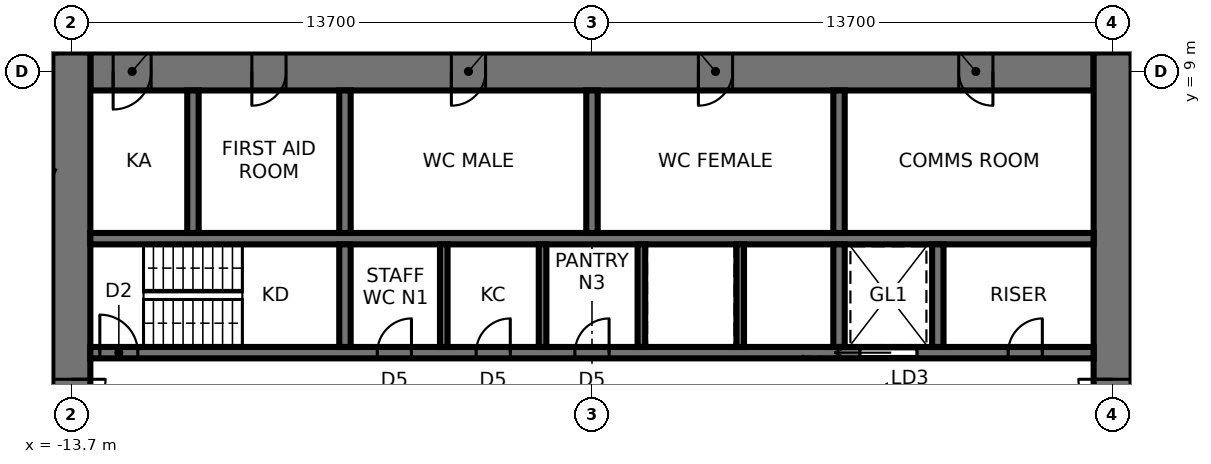
"""IFC4 building model, lengths in metres.
Left out: names, types, materials, properties, quantities, classifications, styles, units other than length and angle.
Written with IfcOpenShell. Run it as: python <this file> out.ifc"""

import sys

from ifc_helpers import new_model, si_unit, direction, frame, frame_2d, origin, place, context, subcontext, project, spatial, rectangle, extrude, element, fill, save


model = new_model("IFC4")
c1 = context("Model", 3, precision=1e-05, world=origin(), true_north=direction((0.0, 1.0)))
c2 = subcontext(c1, "Body", "Model", "MODEL_VIEW")
j1 = project(units=[si_unit("LENGTHUNIT", "METRE"), si_unit("PLANEANGLEUNIT", "RADIAN")], contexts=[c1])
p1 = place(None, origin())
s1 = spatial("IfcSite", under=j1, at=p1, CompositionType="ELEMENT")
p2 = place(p1, origin())
s2 = spatial("IfcBuilding", under=s1, at=p2, CompositionType="ELEMENT")
p3 = place(p2, frame((0.0, 0.0, 127.5)))
s3 = spatial("IfcBuildingStorey", under=s2, at=p3, CompositionType="ELEMENT", Elevation=127.5)
p4 = place(p3, frame((13.2, 9.0, 0.0), z_axis=(0.0, 0.0, 1.0), x_axis=(-1.0, 0.0, 0.0)))
e1 = element("IfcWall", 1, at=p4, inside=s3, PredefinedType="SHEAR", context=c2, shape_type="SweptSolid", body=[
    extrude(rectangle(XDim=26.4, YDim=1.0, at=frame_2d((13.2, 0.0))), origin(), (0.0, 0.0, 1.0), 3.9),
])
p5 = place(p4, frame((2.65, 0.0, 0.0)))
e2 = element("IfcOpeningElement", 2, at=p5, cuts=e1, PredefinedType="OPENING", context=c2, shape_type="SweptSolid", body=[
    extrude(rectangle(XDim=0.9, YDim=2.1, at=frame_2d((0.45, 1.05))), frame((0.0, 0.51, 0.0), z_axis=(0.0, -1.0, 0.0), x_axis=(1.0, 0.0, 0.0)), (0.0, 0.0, 1.0), 1.02),
])
p6 = place(p4, frame((9.5, 0.0, 0.0)))
e3 = element("IfcOpeningElement", 3, at=p6, cuts=e1, PredefinedType="OPENING", context=c2, shape_type="SweptSolid", body=[
    extrude(rectangle(XDim=0.9, YDim=2.1, at=frame_2d((0.45, 1.05))), frame((0.0, 0.51, 0.0), z_axis=(0.0, -1.0, 0.0), x_axis=(1.0, 0.0, 0.0)), (0.0, 0.0, 1.0), 1.02),
])
p7 = place(p4, frame((16.0, 0.0, 0.0)))
e4 = element("IfcOpeningElement", 4, at=p7, cuts=e1, PredefinedType="OPENING", context=c2, shape_type="SweptSolid", body=[
    extrude(rectangle(XDim=0.9, YDim=2.1, at=frame_2d((0.45, 1.05))), frame((0.0, 0.51, 0.0), z_axis=(0.0, -1.0, 0.0), x_axis=(1.0, 0.0, 0.0)), (0.0, 0.0, 1.0), 1.02),
])
p8 = place(p4, frame((21.25, 0.0, 0.0)))
e5 = element("IfcOpeningElement", 5, at=p8, cuts=e1, PredefinedType="OPENING", context=c2, shape_type="SweptSolid", body=[
    extrude(rectangle(XDim=0.9, YDim=2.1, at=frame_2d((0.45, 1.05))), frame((0.0, 0.51, 0.0), z_axis=(0.0, -1.0, 0.0), x_axis=(1.0, 0.0, 0.0)), (0.0, 0.0, 1.0), 1.02),
])
p9 = place(p4, frame((24.8, 0.0, 0.0)))
e6 = element("IfcOpeningElement", 6, at=p9, cuts=e1, PredefinedType="OPENING", context=c2, shape_type="SweptSolid", body=[
    extrude(rectangle(XDim=1.0, YDim=2.1, at=frame_2d((0.5, 1.05))), frame((0.0, 0.51, 0.0), z_axis=(0.0, -1.0, 0.0), x_axis=(1.0, 0.0, 0.0)), (0.0, 0.0, 1.0), 1.02),
])
p10 = place(p3, frame((13.7, -9.5, 0.0), z_axis=(0.0, 0.0, 1.0), x_axis=(0.0, 1.0, 0.0)))
e7 = element("IfcWall", 7, at=p10, inside=s3, PredefinedType="SHEAR", context=c2, shape_type="SweptSolid", body=[
    extrude(rectangle(XDim=19.0, YDim=1.0, at=frame_2d((9.5, 0.0))), origin(), (0.0, 0.0, 1.0), 3.9),
])
p11 = place(p10, frame((8.6, 0.0, 0.0)))
e8 = element("IfcOpeningElement", 8, at=p11, cuts=e7, PredefinedType="OPENING", context=c2, shape_type="SweptSolid", body=[
    extrude(rectangle(XDim=1.8, YDim=2.4, at=frame_2d((0.9, 1.2))), frame((0.0, 0.51, 0.0), z_axis=(0.0, -1.0, 0.0), x_axis=(1.0, 0.0, 0.0)), (0.0, 0.0, 1.0), 1.02),
])
p12 = place(p3, frame((-13.7, 9.5, 0.0), z_axis=(0.0, 0.0, 1.0), x_axis=(0.0, -1.0, 0.0)))
e9 = element("IfcWall", 9, at=p12, inside=s3, PredefinedType="SHEAR", context=c2, shape_type="SweptSolid", body=[
    extrude(rectangle(XDim=19.0, YDim=1.0, at=frame_2d((9.5, 0.0))), origin(), (0.0, 0.0, 1.0), 3.9),
])
p13 = place(p12, frame((8.6, 0.0, 0.0)))
e10 = element("IfcOpeningElement", 10, at=p13, cuts=e9, PredefinedType="OPENING", context=c2, shape_type="SweptSolid", body=[
    extrude(rectangle(XDim=1.8, YDim=2.4, at=frame_2d((0.9, 1.2))), frame((0.0, 0.51, 0.0), z_axis=(0.0, -1.0, 0.0), x_axis=(1.0, 0.0, 0.0)), (0.0, 0.0, 1.0), 1.02),
])
p14 = place(p3, frame((-13.2, 1.6, 0.0), z_axis=(0.0, 0.0, 1.0), x_axis=(1.0, 0.0, 0.0)))
e11 = element("IfcWall", 11, at=p14, inside=s3, PredefinedType="SHEAR", context=c2, shape_type="SweptSolid", body=[
    extrude(rectangle(XDim=26.4, YDim=0.3, at=frame_2d((13.2, 0.0))), origin(), (0.0, 0.0, 1.0), 3.9),
])
p15 = place(p14, frame((0.25, 0.0, 0.0)))
e12 = element("IfcOpeningElement", 12, at=p15, cuts=e11, PredefinedType="OPENING", context=c2, shape_type="SweptSolid", body=[
    extrude(rectangle(XDim=1.0, YDim=2.1, at=frame_2d((0.5, 1.05))), frame((0.0, 0.16, 0.0), z_axis=(0.0, -1.0, 0.0), x_axis=(1.0, 0.0, 0.0)), (0.0, 0.0, 1.0), 0.32),
])
p16 = place(p14, frame((20.25, 0.0, 0.0)))
e13 = element("IfcOpeningElement", 13, at=p16, cuts=e11, PredefinedType="OPENING", context=c2, shape_type="SweptSolid", body=[
    extrude(rectangle(XDim=1.5, YDim=2.4, at=frame_2d((0.75, 1.2))), frame((0.0, 0.16, 0.0), z_axis=(0.0, -1.0, 0.0), x_axis=(1.0, 0.0, 0.0)), (0.0, 0.0, 1.0), 0.32),
])
p17 = place(p14, frame((7.55, 0.0, 0.0)))
e14 = element("IfcOpeningElement", 14, at=p17, cuts=e11, PredefinedType="OPENING", context=c2, shape_type="SweptSolid", body=[
    extrude(rectangle(XDim=0.9, YDim=2.1, at=frame_2d((0.45, 1.05))), frame((0.0, 0.16, 0.0), z_axis=(0.0, -1.0, 0.0), x_axis=(1.0, 0.0, 0.0)), (0.0, 0.0, 1.0), 0.32),
])
p18 = place(p14, frame((10.15, 0.0, 0.0)))
e15 = element("IfcOpeningElement", 15, at=p18, cuts=e11, PredefinedType="OPENING", context=c2, shape_type="SweptSolid", body=[
    extrude(rectangle(XDim=0.9, YDim=2.1, at=frame_2d((0.45, 1.05))), frame((0.0, 0.16, 0.0), z_axis=(0.0, -1.0, 0.0), x_axis=(1.0, 0.0, 0.0)), (0.0, 0.0, 1.0), 0.32),
])
p19 = place(p14, frame((12.75, 0.0, 0.0)))
e16 = element("IfcOpeningElement", 16, at=p19, cuts=e11, PredefinedType="OPENING", context=c2, shape_type="SweptSolid", body=[
    extrude(rectangle(XDim=0.9, YDim=2.1, at=frame_2d((0.45, 1.05))), frame((0.0, 0.16, 0.0), z_axis=(0.0, -1.0, 0.0), x_axis=(1.0, 0.0, 0.0)), (0.0, 0.0, 1.0), 0.32),
])
p20 = place(p14, frame((24.15, 0.0, 0.0)))
e17 = element("IfcOpeningElement", 17, at=p20, cuts=e11, PredefinedType="OPENING", context=c2, shape_type="SweptSolid", body=[
    extrude(rectangle(XDim=0.9, YDim=2.1, at=frame_2d((0.45, 1.05))), frame((0.0, 0.16, 0.0), z_axis=(0.0, -1.0, 0.0), x_axis=(1.0, 0.0, 0.0)), (0.0, 0.0, 1.0), 0.32),
])
p21 = place(p3, frame((-13.2, 4.6, 0.0), z_axis=(0.0, 0.0, 1.0), x_axis=(1.0, 0.0, 0.0)))
e18 = element("IfcWall", 18, at=p21, inside=s3, PredefinedType="SHEAR", context=c2, shape_type="SweptSolid", body=[
    extrude(rectangle(XDim=26.4, YDim=0.3, at=frame_2d((13.2, 0.0))), origin(), (0.0, 0.0, 1.0), 3.9),
])
p22 = place(p3, frame((-6.5, 1.75, 0.0), z_axis=(0.0, 0.0, 1.0), x_axis=(0.0, 1.0, 0.0)))
e19 = element("IfcWall", 19, at=p22, inside=s3, PredefinedType="SHEAR", context=c2, shape_type="SweptSolid", body=[
    extrude(rectangle(XDim=2.7, YDim=0.3, at=frame_2d((1.35, 0.0))), origin(), (0.0, 0.0, 1.0), 3.9),
])
p23 = place(p3, frame((-6.5, 4.75, 0.0), z_axis=(0.0, 0.0, 1.0), x_axis=(0.0, 1.0, 0.0)))
e20 = element("IfcWall", 20, at=p23, inside=s3, PredefinedType="SHEAR", context=c2, shape_type="SweptSolid", body=[
    extrude(rectangle(XDim=3.75, YDim=0.3, at=frame_2d((1.875, 0.0))), origin(), (0.0, 0.0, 1.0), 3.9),
])
p24 = place(p3, frame((6.5, 1.75, 0.0), z_axis=(0.0, 0.0, 1.0), x_axis=(0.0, 1.0, 0.0)))
e21 = element("IfcWall", 21, at=p24, inside=s3, PredefinedType="SHEAR", context=c2, shape_type="SweptSolid", body=[
    extrude(rectangle(XDim=2.7, YDim=0.3, at=frame_2d((1.35, 0.0))), origin(), (0.0, 0.0, 1.0), 3.9),
])
p25 = place(p3, frame((6.5, 4.75, 0.0), z_axis=(0.0, 0.0, 1.0), x_axis=(0.0, 1.0, 0.0)))
e22 = element("IfcWall", 22, at=p25, inside=s3, PredefinedType="SHEAR", context=c2, shape_type="SweptSolid", body=[
    extrude(rectangle(XDim=3.75, YDim=0.3, at=frame_2d((1.875, 0.0))), origin(), (0.0, 0.0, 1.0), 3.9),
])
for number, where, z_axis, x_axis in (
    (23, (-3.9, 1.75, 0.0), (0.0, 0.0, 1.0), (0.0, 1.0, 0.0)),
    (24, (-1.3, 1.75, 0.0), (0.0, 0.0, 1.0), (0.0, 1.0, 0.0)),
    (25, (1.3, 1.75, 0.0), (0.0, 0.0, 1.0), (0.0, 1.0, 0.0)),
    (26, (3.9, 1.75, 0.0), (0.0, 0.0, 1.0), (0.0, 1.0, 0.0)),
):
    element("IfcWall", number, at=place(p3, frame(where, z_axis=z_axis, x_axis=x_axis)), inside=s3, PredefinedType="SHEAR", context=c2, shape_type="SweptSolid", body=[
        extrude(rectangle(XDim=2.7, YDim=0.2, at=frame_2d((1.35, 0.0))), origin(), (0.0, 0.0, 1.0), 3.9),
    ])
for number, where, z_axis, x_axis in (
    (27, (0.0, 4.75, 0.0), (0.0, 0.0, 1.0), (0.0, 1.0, 0.0)),
    (28, (-10.5, 4.75, 0.0), (0.0, 0.0, 1.0), (0.0, 1.0, 0.0)),
):
    element("IfcWall", number, at=place(p3, frame(where, z_axis=z_axis, x_axis=x_axis)), inside=s3, PredefinedType="SHEAR", context=c2, shape_type="SweptSolid", body=[
        extrude(rectangle(XDim=3.75, YDim=0.3, at=frame_2d((1.875, 0.0))), origin(), (0.0, 0.0, 1.0), 3.9),
    ])
p26 = place(p3, frame((9.1, 1.75, 0.0), z_axis=(0.0, 0.0, 1.0), x_axis=(0.0, 1.0, 0.0)))
e29 = element("IfcWall", 29, at=p26, inside=s3, PredefinedType="SHEAR", context=c2, shape_type="SweptSolid", body=[
    extrude(rectangle(XDim=2.7, YDim=0.3, at=frame_2d((1.35, 0.0))), origin(), (0.0, 0.0, 1.0), 3.9),
])
p27 = place(p3, frame((-14.2, 6.322, 0.0), z_axis=(0.0, 0.0, 1.0), x_axis=(-0.913544220381, 0.406739421999, 0.0)))
e30 = element("IfcWall", 30, at=p27, inside=s3, PredefinedType="PARTITIONING", context=c2, shape_type="SweptSolid", body=[
    extrude(rectangle(XDim=9.271, YDim=0.15, at=frame_2d((4.636, 0.0))), origin(), (0.0, 0.0, 1.0), 3.74),
])
p28 = place(p13, origin())
e31 = element("IfcDoor", 31, at=p28, inside=s3, OperationType="DOUBLE_DOOR_SINGLE_SWING", PredefinedType="DOOR", context=c2, shape_type="SweptSolid", body=[
    extrude(rectangle(XDim=1.72, YDim=2.36, at=frame_2d((0.9, 1.18))), frame((0.0, 0.025, 0.0), z_axis=(0.0, -1.0, 0.0), x_axis=(1.0, 0.0, 0.0)), (0.0, 0.0, 1.0), 0.05),
    extrude(rectangle(XDim=0.04, YDim=2.4, at=frame_2d((0.02, 1.2))), frame((0.0, 0.25, 0.0), z_axis=(0.0, -1.0, 0.0), x_axis=(1.0, 0.0, 0.0)), (0.0, 0.0, 1.0), 0.5),
    extrude(rectangle(XDim=0.04, YDim=2.4, at=frame_2d((1.78, 1.2))), frame((0.0, 0.25, 0.0), z_axis=(0.0, -1.0, 0.0), x_axis=(1.0, 0.0, 0.0)), (0.0, 0.0, 1.0), 0.5),
    extrude(rectangle(XDim=1.72, YDim=0.04, at=frame_2d((0.9, 2.38))), frame((0.0, 0.25, 0.0), z_axis=(0.0, -1.0, 0.0), x_axis=(1.0, 0.0, 0.0)), (0.0, 0.0, 1.0), 0.5),
])
fill(e10, e31)
p29 = place(p11, origin())
e32 = element("IfcDoor", 32, at=p29, inside=s3, OperationType="DOUBLE_DOOR_SINGLE_SWING", PredefinedType="DOOR", context=c2, shape_type="SweptSolid", body=[
    extrude(rectangle(XDim=1.72, YDim=2.36, at=frame_2d((0.9, 1.18))), frame((0.0, 0.025, 0.0), z_axis=(0.0, -1.0, 0.0), x_axis=(1.0, 0.0, 0.0)), (0.0, 0.0, 1.0), 0.05),
    extrude(rectangle(XDim=0.04, YDim=2.4, at=frame_2d((0.02, 1.2))), frame((0.0, 0.25, 0.0), z_axis=(0.0, -1.0, 0.0), x_axis=(1.0, 0.0, 0.0)), (0.0, 0.0, 1.0), 0.5),
    extrude(rectangle(XDim=0.04, YDim=2.4, at=frame_2d((1.78, 1.2))), frame((0.0, 0.25, 0.0), z_axis=(0.0, -1.0, 0.0), x_axis=(1.0, 0.0, 0.0)), (0.0, 0.0, 1.0), 0.5),
    extrude(rectangle(XDim=1.72, YDim=0.04, at=frame_2d((0.9, 2.38))), frame((0.0, 0.25, 0.0), z_axis=(0.0, -1.0, 0.0), x_axis=(1.0, 0.0, 0.0)), (0.0, 0.0, 1.0), 0.5),
])
fill(e8, e32)
p30 = place(p15, origin())
e33 = element("IfcDoor", 33, at=p30, inside=s3, OperationType="SINGLE_SWING_LEFT", PredefinedType="DOOR", context=c2, shape_type="SweptSolid", body=[
    extrude(rectangle(XDim=1.0, YDim=2.1, at=frame_2d((0.5, 1.05))), frame((0.0, 0.025, 0.0), z_axis=(0.0, -1.0, 0.0), x_axis=(1.0, 0.0, 0.0)), (0.0, 0.0, 1.0), 0.05),
])
fill(e12, e33)
p31 = place(p16, origin())
e34 = element("IfcDoor", 34, at=p31, inside=s3, OperationType="SLIDING_TO_LEFT", PredefinedType="DOOR", context=c2, shape_type="SweptSolid", body=[
    extrude(rectangle(XDim=1.5, YDim=2.4, at=frame_2d((0.75, 1.2))), frame((0.0, 0.025, 0.0), z_axis=(0.0, -1.0, 0.0), x_axis=(1.0, 0.0, 0.0)), (0.0, 0.0, 1.0), 0.05),
])
fill(e13, e34)
p32 = place(p17, origin())
e35 = element("IfcDoor", 35, at=p32, inside=s3, OperationType="SINGLE_SWING_RIGHT", PredefinedType="DOOR", context=c2, shape_type="SweptSolid", body=[
    extrude(rectangle(XDim=0.9, YDim=2.1, at=frame_2d((0.45, 1.05))), frame((0.0, 0.025, 0.0), z_axis=(0.0, -1.0, 0.0), x_axis=(1.0, 0.0, 0.0)), (0.0, 0.0, 1.0), 0.05),
])
fill(e14, e35)
p33 = place(p18, origin())
e36 = element("IfcDoor", 36, at=p33, inside=s3, OperationType="SINGLE_SWING_RIGHT", PredefinedType="DOOR", context=c2, shape_type="SweptSolid", body=[
    extrude(rectangle(XDim=0.9, YDim=2.1, at=frame_2d((0.45, 1.05))), frame((0.0, 0.025, 0.0), z_axis=(0.0, -1.0, 0.0), x_axis=(1.0, 0.0, 0.0)), (0.0, 0.0, 1.0), 0.05),
])
fill(e15, e36)
p34 = place(p19, origin())
e37 = element("IfcDoor", 37, at=p34, inside=s3, OperationType="SINGLE_SWING_RIGHT", PredefinedType="DOOR", context=c2, shape_type="SweptSolid", body=[
    extrude(rectangle(XDim=0.9, YDim=2.1, at=frame_2d((0.45, 1.05))), frame((0.0, 0.025, 0.0), z_axis=(0.0, -1.0, 0.0), x_axis=(1.0, 0.0, 0.0)), (0.0, 0.0, 1.0), 0.05),
])
fill(e16, e37)
p35 = place(p20, origin())
e38 = element("IfcDoor", 38, at=p35, inside=s3, OperationType="SINGLE_SWING_RIGHT", PredefinedType="DOOR", context=c2, shape_type="SweptSolid", body=[
    extrude(rectangle(XDim=0.9, YDim=2.1, at=frame_2d((0.45, 1.05))), frame((0.0, 0.025, 0.0), z_axis=(0.0, -1.0, 0.0), x_axis=(1.0, 0.0, 0.0)), (0.0, 0.0, 1.0), 0.05),
])
fill(e17, e38)
p36 = place(p5, origin())
e39 = element("IfcDoor", 39, at=p36, inside=s3, OperationType="SINGLE_SWING_LEFT", PredefinedType="DOOR", context=c2, shape_type="SweptSolid", body=[
    extrude(rectangle(XDim=0.82, YDim=2.06, at=frame_2d((0.45, 1.03))), frame((0.0, 0.025, 0.0), z_axis=(0.0, -1.0, 0.0), x_axis=(1.0, 0.0, 0.0)), (0.0, 0.0, 1.0), 0.05),
    extrude(rectangle(XDim=0.04, YDim=2.1, at=frame_2d((0.02, 1.05))), frame((0.0, 0.25, 0.0), z_axis=(0.0, -1.0, 0.0), x_axis=(1.0, 0.0, 0.0)), (0.0, 0.0, 1.0), 0.5),
    extrude(rectangle(XDim=0.04, YDim=2.1, at=frame_2d((0.88, 1.05))), frame((0.0, 0.25, 0.0), z_axis=(0.0, -1.0, 0.0), x_axis=(1.0, 0.0, 0.0)), (0.0, 0.0, 1.0), 0.5),
    extrude(rectangle(XDim=0.82, YDim=0.04, at=frame_2d((0.45, 2.08))), frame((0.0, 0.25, 0.0), z_axis=(0.0, -1.0, 0.0), x_axis=(1.0, 0.0, 0.0)), (0.0, 0.0, 1.0), 0.5),
])
fill(e2, e39)
p37 = place(p6, origin())
e40 = element("IfcDoor", 40, at=p37, inside=s3, OperationType="SINGLE_SWING_RIGHT", PredefinedType="DOOR", context=c2, shape_type="SweptSolid", body=[
    extrude(rectangle(XDim=0.82, YDim=2.06, at=frame_2d((0.45, 1.03))), frame((0.0, 0.025, 0.0), z_axis=(0.0, -1.0, 0.0), x_axis=(1.0, 0.0, 0.0)), (0.0, 0.0, 1.0), 0.05),
    extrude(rectangle(XDim=0.04, YDim=2.1, at=frame_2d((0.02, 1.05))), frame((0.0, 0.25, 0.0), z_axis=(0.0, -1.0, 0.0), x_axis=(1.0, 0.0, 0.0)), (0.0, 0.0, 1.0), 0.5),
    extrude(rectangle(XDim=0.04, YDim=2.1, at=frame_2d((0.88, 1.05))), frame((0.0, 0.25, 0.0), z_axis=(0.0, -1.0, 0.0), x_axis=(1.0, 0.0, 0.0)), (0.0, 0.0, 1.0), 0.5),
    extrude(rectangle(XDim=0.82, YDim=0.04, at=frame_2d((0.45, 2.08))), frame((0.0, 0.25, 0.0), z_axis=(0.0, -1.0, 0.0), x_axis=(1.0, 0.0, 0.0)), (0.0, 0.0, 1.0), 0.5),
])
fill(e3, e40)
p38 = place(p7, origin())
e41 = element("IfcDoor", 41, at=p38, inside=s3, OperationType="SINGLE_SWING_RIGHT", PredefinedType="DOOR", context=c2, shape_type="SweptSolid", body=[
    extrude(rectangle(XDim=0.82, YDim=2.06, at=frame_2d((0.45, 1.03))), frame((0.0, 0.025, 0.0), z_axis=(0.0, -1.0, 0.0), x_axis=(1.0, 0.0, 0.0)), (0.0, 0.0, 1.0), 0.05),
    extrude(rectangle(XDim=0.04, YDim=2.1, at=frame_2d((0.02, 1.05))), frame((0.0, 0.25, 0.0), z_axis=(0.0, -1.0, 0.0), x_axis=(1.0, 0.0, 0.0)), (0.0, 0.0, 1.0), 0.5),
    extrude(rectangle(XDim=0.04, YDim=2.1, at=frame_2d((0.88, 1.05))), frame((0.0, 0.25, 0.0), z_axis=(0.0, -1.0, 0.0), x_axis=(1.0, 0.0, 0.0)), (0.0, 0.0, 1.0), 0.5),
    extrude(rectangle(XDim=0.82, YDim=0.04, at=frame_2d((0.45, 2.08))), frame((0.0, 0.25, 0.0), z_axis=(0.0, -1.0, 0.0), x_axis=(1.0, 0.0, 0.0)), (0.0, 0.0, 1.0), 0.5),
])
fill(e4, e41)
p39 = place(p8, origin())
e42 = element("IfcDoor", 42, at=p39, inside=s3, OperationType="SINGLE_SWING_RIGHT", PredefinedType="DOOR", context=c2, shape_type="SweptSolid", body=[
    extrude(rectangle(XDim=0.82, YDim=2.06, at=frame_2d((0.45, 1.03))), frame((0.0, 0.025, 0.0), z_axis=(0.0, -1.0, 0.0), x_axis=(1.0, 0.0, 0.0)), (0.0, 0.0, 1.0), 0.05),
    extrude(rectangle(XDim=0.04, YDim=2.1, at=frame_2d((0.02, 1.05))), frame((0.0, 0.25, 0.0), z_axis=(0.0, -1.0, 0.0), x_axis=(1.0, 0.0, 0.0)), (0.0, 0.0, 1.0), 0.5),
    extrude(rectangle(XDim=0.04, YDim=2.1, at=frame_2d((0.88, 1.05))), frame((0.0, 0.25, 0.0), z_axis=(0.0, -1.0, 0.0), x_axis=(1.0, 0.0, 0.0)), (0.0, 0.0, 1.0), 0.5),
    extrude(rectangle(XDim=0.82, YDim=0.04, at=frame_2d((0.45, 2.08))), frame((0.0, 0.25, 0.0), z_axis=(0.0, -1.0, 0.0), x_axis=(1.0, 0.0, 0.0)), (0.0, 0.0, 1.0), 0.5),
])
fill(e5, e42)
p40 = place(p9, origin())
e43 = element("IfcDoor", 43, at=p40, inside=s3, OperationType="SINGLE_SWING_RIGHT", PredefinedType="DOOR", context=c2, shape_type="SweptSolid", body=[
    extrude(rectangle(XDim=0.92, YDim=2.06, at=frame_2d((0.5, 1.03))), frame((0.0, 0.025, 0.0), z_axis=(0.0, -1.0, 0.0), x_axis=(1.0, 0.0, 0.0)), (0.0, 0.0, 1.0), 0.05),
    extrude(rectangle(XDim=0.04, YDim=2.1, at=frame_2d((0.02, 1.05))), frame((0.0, 0.25, 0.0), z_axis=(0.0, -1.0, 0.0), x_axis=(1.0, 0.0, 0.0)), (0.0, 0.0, 1.0), 0.5),
    extrude(rectangle(XDim=0.04, YDim=2.1, at=frame_2d((0.98, 1.05))), frame((0.0, 0.25, 0.0), z_axis=(0.0, -1.0, 0.0), x_axis=(1.0, 0.0, 0.0)), (0.0, 0.0, 1.0), 0.5),
    extrude(rectangle(XDim=0.92, YDim=0.04, at=frame_2d((0.5, 2.08))), frame((0.0, 0.25, 0.0), z_axis=(0.0, -1.0, 0.0), x_axis=(1.0, 0.0, 0.0)), (0.0, 0.0, 1.0), 0.5),
])
fill(e6, e43)
save(model, sys.argv[1])
